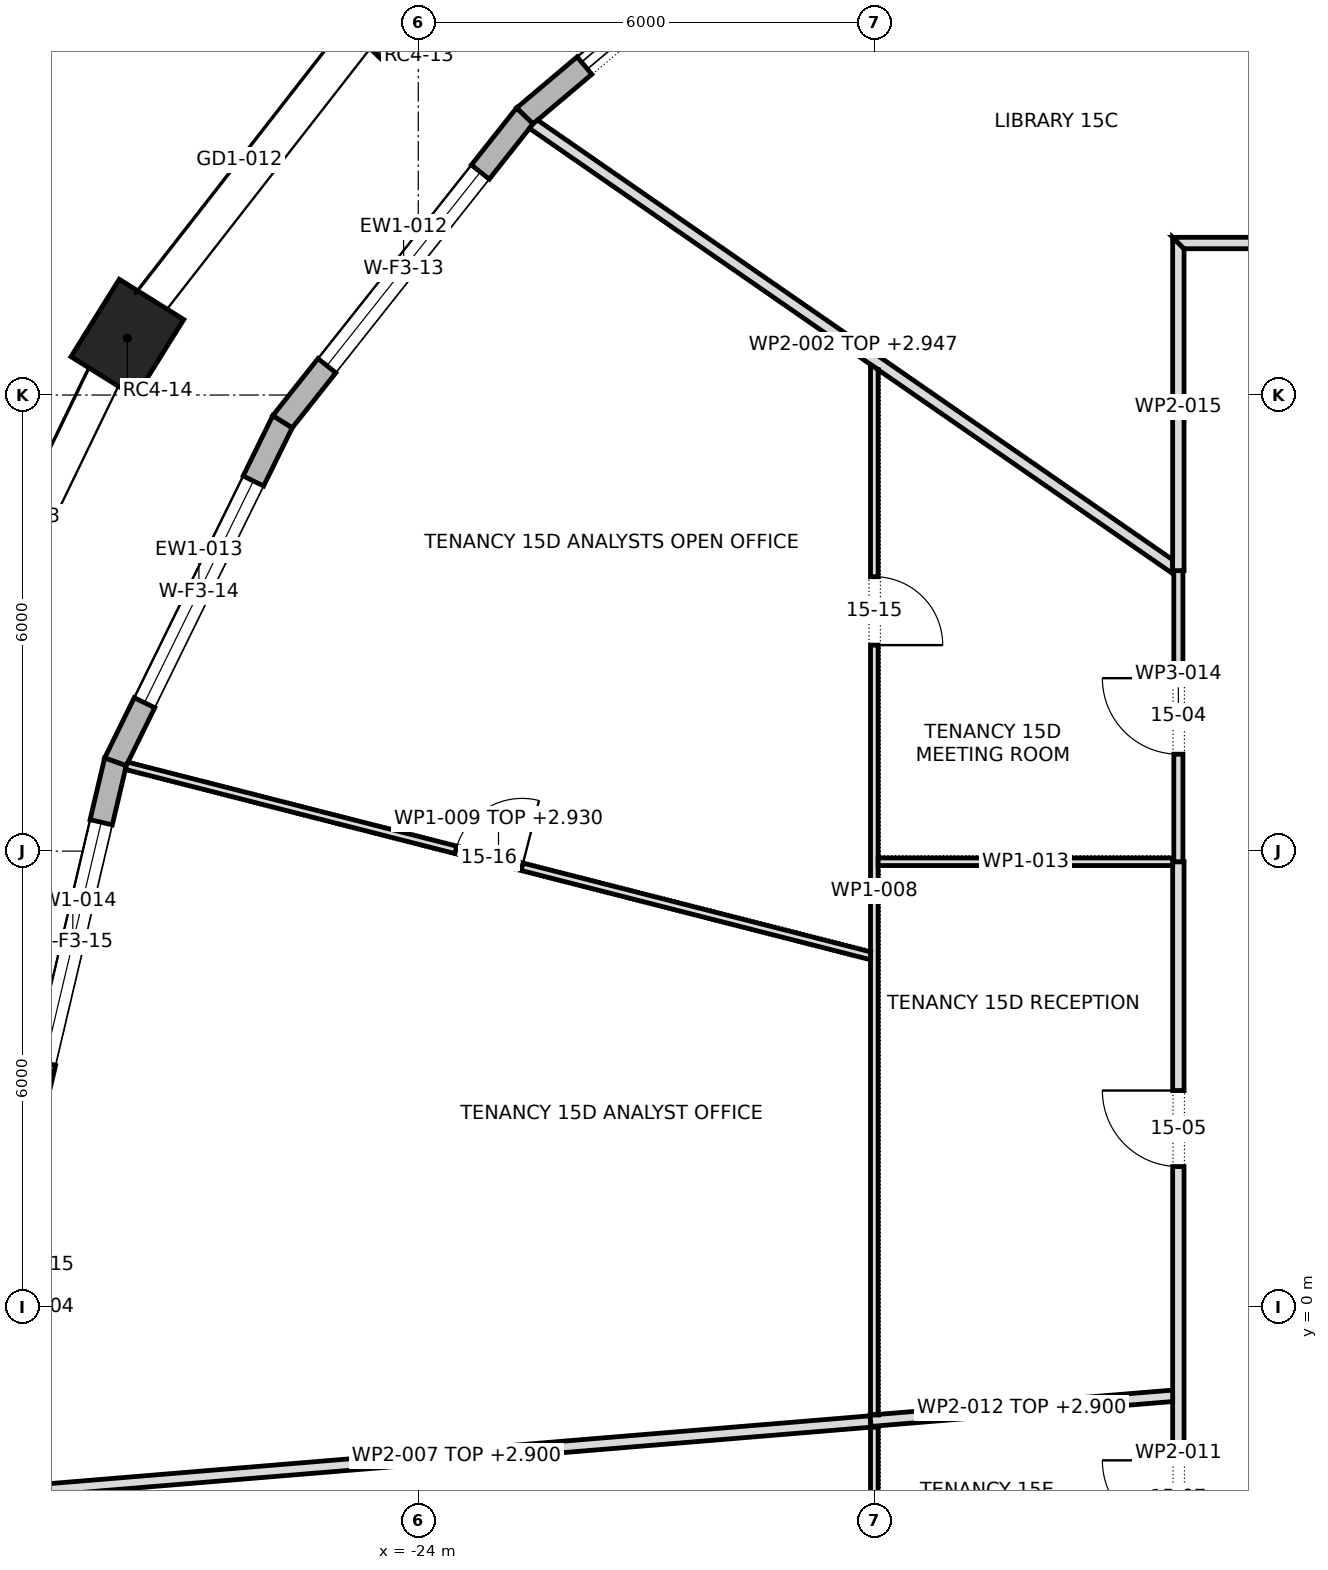
"""IFC4 building model, lengths in metres.
Left out: names, types, materials, properties, quantities, classifications, styles, units other than length and angle.
Written with IfcOpenShell. Run it as: python <this file> out.ifc"""

import sys

from ifc_helpers import new_model, si_unit, direction, frame, frame_2d, origin, origin_2d, place, context, subcontext, project, spatial, polyline, rectangle, outline, extrude, element, fill, save


model = new_model("IFC4")
c1 = context("Model", 3, precision=1e-05, world=origin(), true_north=direction((0.0, 1.0)))
c2 = subcontext(c1, "Body", "Model", "MODEL_VIEW")
j1 = project(units=[si_unit("LENGTHUNIT", "METRE"), si_unit("PLANEANGLEUNIT", "RADIAN")], contexts=[c1])
p1 = place(None, origin())
s1 = spatial("IfcSite", under=j1, at=p1, CompositionType="ELEMENT")
p2 = place(p1, origin())
s2 = spatial("IfcBuilding", under=s1, at=p2, CompositionType="ELEMENT")
p3 = place(p2, frame((0.0, 0.0, 222.9)))
s3 = spatial("IfcBuildingStorey", under=s2, at=p3, CompositionType="ELEMENT", Elevation=222.9)
for number, where, z_axis, x_axis in (
    (1, (-24.39, 17.157, 0.0), (0.0, 0.0, 1.0), (-0.692, -0.722, 0.0)),
    (2, (-27.827, 12.749, 0.0), (0.0, 0.0, 1.0), (-0.529, -0.849, 0.0)),
):
    element("IfcColumn", number, at=place(p3, frame(where, z_axis=z_axis, x_axis=x_axis)), inside=s3, PredefinedType="COLUMN", context=c2, shape_type="SweptSolid", body=[
        extrude(rectangle(XDim=1.2, YDim=1.0, at=origin_2d()), origin(), (0.0, 0.0, 1.0), 4.0),
    ])
p4 = place(p3, frame((-18.543, 19.092, 0.0), z_axis=(0.0, 0.0, 1.0), x_axis=(-0.764397795062, -0.644744919255, 0.0)))
e3 = element("IfcWall", 3, at=p4, inside=s3, PredefinedType="STANDARD", context=c2, shape_type="SweptSolid", body=[
    extrude(outline(polyline([(-0.014, -0.15), (5.32, -0.15), (5.29, 0.15), (0.014, 0.15), (-0.014, -0.15)])), origin(), (0.0, 0.0, 1.0), 3.7),
])
p5 = place(p4, frame((1.028, 0.0, 0.0)))
e4 = element("IfcOpeningElement", 4, at=p5, cuts=e3, PredefinedType="OPENING", context=c2, shape_type="SweptSolid", body=[
    extrude(rectangle(XDim=3.25, YDim=3.25, at=frame_2d((1.625, 1.625))), frame((0.0, 0.162, 0.0), z_axis=(0.0, -1.0, 0.0), x_axis=(1.0, 0.0, 0.0)), (0.0, 0.0, 1.0), 0.324),
])
p6 = place(p3, frame((-22.599, 15.672, 0.0), z_axis=(0.0, 0.0, 1.0), x_axis=(-0.621017151557, -0.783796974651, 0.0)))
e5 = element("IfcWall", 5, at=p6, inside=s3, PredefinedType="STANDARD", context=c2, shape_type="SweptSolid", body=[
    extrude(outline(polyline([(-0.015, -0.15), (5.15, -0.15), (5.118, 0.15), (0.015, 0.15), (-0.015, -0.15)])), origin(), (0.0, 0.0, 1.0), 3.7),
])
p7 = place(p6, frame((0.942, 0.0, 0.6)))
e6 = element("IfcOpeningElement", 6, at=p7, cuts=e5, PredefinedType="OPENING", context=c2, shape_type="SweptSolid", body=[
    extrude(rectangle(XDim=3.25, YDim=2.65, at=frame_2d((1.625, 1.325))), frame((0.0, 0.162, 0.0), z_axis=(0.0, -1.0, 0.0), x_axis=(1.0, 0.0, 0.0)), (0.0, 0.0, 1.0), 0.324),
])
p8 = place(p3, frame((-25.787, 11.648, 0.0), z_axis=(0.0, 0.0, 1.0), x_axis=(-0.440795186599, -0.897607711348, 0.0)))
e7 = element("IfcWall", 7, at=p8, inside=s3, PredefinedType="STANDARD", context=c2, shape_type="SweptSolid", body=[
    extrude(outline(polyline([(-0.016, -0.15), (5.001, -0.15), (4.967, 0.15), (0.016, 0.15), (-0.016, -0.15)])), origin(), (0.0, 0.0, 1.0), 3.7),
])
p9 = place(p8, frame((0.867, 0.0, 0.6)))
e8 = element("IfcOpeningElement", 8, at=p9, cuts=e7, PredefinedType="OPENING", context=c2, shape_type="SweptSolid", body=[
    extrude(rectangle(XDim=3.25, YDim=2.65, at=frame_2d((1.625, 1.325))), frame((0.0, 0.162, 0.0), z_axis=(0.0, -1.0, 0.0), x_axis=(1.0, 0.0, 0.0)), (0.0, 0.0, 1.0), 0.324),
])
p10 = place(p3, frame((-27.984, 7.174, 0.0), z_axis=(0.0, 0.0, 1.0), x_axis=(-0.229546618766, -0.97329766763, 0.0)))
e9 = element("IfcWall", 9, at=p10, inside=s3, PredefinedType="STANDARD", context=c2, shape_type="SweptSolid", body=[
    extrude(outline(polyline([(-0.017, -0.15), (4.899, -0.15), (4.865, 0.15), (0.017, 0.15), (-0.017, -0.15)])), origin(), (0.0, 0.0, 1.0), 3.7),
])
p11 = place(p10, frame((0.816, 0.0, 0.6)))
e10 = element("IfcOpeningElement", 10, at=p11, cuts=e9, PredefinedType="OPENING", context=c2, shape_type="SweptSolid", body=[
    extrude(rectangle(XDim=3.25, YDim=2.65, at=frame_2d((1.625, 1.325))), frame((0.0, 0.162, 0.0), z_axis=(0.0, -1.0, 0.0), x_axis=(1.0, 0.0, 0.0)), (0.0, 0.0, 1.0), 0.324),
])
p12 = place(p3, frame((-29.104, -2.423, 0.0), z_axis=(0.0, 0.0, 1.0), x_axis=(0.229546618766, -0.97329766763, 0.0)))
e11 = element("IfcWall", 11, at=p12, inside=s3, PredefinedType="STANDARD", context=c2, shape_type="SweptSolid", body=[
    extrude(outline(polyline([(-0.017, -0.15), (4.899, -0.15), (4.865, 0.15), (0.017, 0.15), (-0.017, -0.15)])), origin(), (0.0, 0.0, 1.0), 3.7),
])
p13 = place(p12, frame((0.816, 0.0, 0.6)))
e12 = element("IfcOpeningElement", 12, at=p13, cuts=e11, PredefinedType="OPENING", context=c2, shape_type="SweptSolid", body=[
    extrude(rectangle(XDim=3.25, YDim=2.65, at=frame_2d((1.625, 1.325))), frame((0.0, 0.162, 0.0), z_axis=(0.0, -1.0, 0.0), x_axis=(1.0, 0.0, 0.0)), (0.0, 0.0, 1.0), 0.324),
])
p14 = place(p3, frame((-22.494, 15.57, 0.0), z_axis=(0.0, 0.0, 1.0), x_axis=(0.822227997751, -0.569158255421, 0.0)))
e13 = element("IfcWall", 13, at=p14, inside=s3, PredefinedType="PARTITIONING", context=c2, shape_type="SweptSolid", body=[
    extrude(outline(polyline([(0.0, -0.075), (1.858, -0.075), (3.717, -0.075), (5.575, -0.075), (5.577, -0.073), (5.578, -0.075), (7.155, -0.075), (8.732, -0.075), (10.309, -0.075), (10.309, -0.075), (10.281, -0.034), (10.269, -0.043), (10.24, -0.002), (10.24, -0.002), (10.187, 0.075), (8.493, 0.075), (6.8, 0.075), (5.106, 0.075), (3.412, 0.075), (1.719, 0.075), (0.025, 0.075), (0.004, -0.0), (0.0, -0.066), (0.0, -0.075)])), origin(), (0.0, 0.0, 1.0), 2.947),
])
p15 = place(p3, frame((-18.0, -12.421, 0.0), z_axis=(0.0, 0.0, 1.0), x_axis=(0.0, 1.0, 0.0)))
e14 = element("IfcWall", 14, at=p15, inside=s3, PredefinedType="PARTITIONING", context=c2, shape_type="SweptSolid", body=[
    extrude(outline(polyline([(0.087, -0.05), (1.77, -0.05), (3.453, -0.05), (5.136, -0.05), (6.819, -0.05), (8.501, -0.05), (8.501, -0.05), (8.601, -0.05), (8.601, -0.05), (10.842, -0.05), (10.842, 0.046), (10.842, 0.05), (9.191, 0.05), (7.541, 0.05), (5.89, 0.05), (4.24, 0.05), (4.235, 0.048), (4.234, 0.05), (2.823, 0.05), (1.411, 0.05), (0.0, 0.05), (0.0, 0.05), (0.011, 0.034), (0.023, 0.043), (0.087, -0.05)])), origin(), (0.0, 0.0, 1.0), 3.7),
])
p16 = place(p15, frame((5.981, 0.0, 0.0)))
e15 = element("IfcOpeningElement", 15, at=p16, cuts=e14, PredefinedType="OPENING", context=c2, shape_type="SweptSolid", body=[
    extrude(rectangle(XDim=0.9, YDim=2.1, at=frame_2d((0.45, 1.05))), frame((0.0, 0.062, 0.0), z_axis=(0.0, -1.0, 0.0), x_axis=(1.0, 0.0, 0.0)), (0.0, 0.0, 1.0), 0.124),
])
p17 = place(p3, frame((-18.049, -1.504, 0.0), z_axis=(0.0, 0.0, 1.0), x_axis=(-0.996601116086, -0.082378488796, 0.0)))
e16 = element("IfcWall", 16, at=p17, inside=s3, PredefinedType="PARTITIONING", context=c2, shape_type="SweptSolid", body=[
    extrude(outline(polyline([(10.936, -0.075), (10.936, 0.044), (10.931, 0.075), (9.11, 0.075), (7.29, 0.075), (5.469, 0.075), (3.648, 0.075), (1.828, 0.075), (0.007, 0.075), (0.007, 0.074), (0.002, 0.075), (0.0, 0.075), (0.0, -0.075), (1.823, -0.075), (3.645, -0.075), (5.468, -0.075), (7.291, -0.075), (9.113, -0.075), (10.936, -0.075)])), origin(), (0.0, 0.0, 1.0), 2.9),
])
p18 = place(p3, frame((-18.0, -1.418, 0.0), z_axis=(0.0, 0.0, 1.0), x_axis=(0.0, 1.0, 0.0)))
e17 = element("IfcWall", 17, at=p18, inside=s3, PredefinedType="PARTITIONING", context=c2, shape_type="SweptSolid", body=[
    extrude(outline(polyline([(0.008, -0.05), (1.813, -0.05), (3.618, -0.05), (5.423, -0.05), (7.229, -0.05), (7.229, -0.05), (7.328, -0.05), (7.328, -0.05), (8.934, -0.05), (10.54, -0.05), (12.146, -0.05), (13.751, -0.05), (13.821, 0.05), (13.821, 0.05), (11.889, 0.05), (9.957, 0.05), (8.025, 0.05), (6.093, 0.05), (6.092, 0.048), (6.085, 0.05), (4.564, 0.05), (3.042, 0.05), (1.521, 0.05), (0.0, 0.05), (0.0, 0.045), (0.008, -0.05)])), origin(), (0.0, 0.0, 1.0), 3.7),
])
p19 = place(p18, frame((10.128, 0.0, 0.0)))
e18 = element("IfcOpeningElement", 18, at=p19, cuts=e17, PredefinedType="OPENING", context=c2, shape_type="SweptSolid", body=[
    extrude(rectangle(XDim=0.9, YDim=2.1, at=frame_2d((0.45, 1.05))), frame((0.0, 0.062, 0.0), z_axis=(0.0, -1.0, 0.0), x_axis=(1.0, 0.0, 0.0)), (0.0, 0.0, 1.0), 0.124),
])
p20 = place(p3, frame((-18.038, 4.62, 0.0), z_axis=(0.0, 0.0, 1.0), x_axis=(-0.96889210833, 0.247483499279, 0.0)))
e19 = element("IfcWall", 19, at=p20, inside=s3, PredefinedType="PARTITIONING", context=c2, shape_type="SweptSolid", body=[
    extrude(outline(polyline([(0.025, -0.05), (1.706, -0.05), (3.386, -0.05), (5.067, -0.05), (6.747, -0.05), (8.427, -0.05), (10.108, -0.05), (10.117, -0.005), (10.117, 0.05), (8.431, 0.05), (6.745, 0.05), (5.059, 0.05), (3.373, 0.05), (1.686, 0.05), (0.0, 0.05), (0.0, 0.049), (0.025, -0.05)])), origin(), (0.0, 0.0, 1.0), 2.93),
])
p21 = place(p20, frame((4.744, 0.0, 0.0)))
e20 = element("IfcOpeningElement", 20, at=p21, cuts=e19, PredefinedType="OPENING", context=c2, shape_type="SweptSolid", body=[
    extrude(rectangle(XDim=0.9, YDim=2.1, at=frame_2d((0.45, 1.05))), frame((0.0, 0.062, 0.0), z_axis=(0.0, -1.0, 0.0), x_axis=(1.0, 0.0, 0.0)), (0.0, 0.0, 1.0), 0.124),
])
p22 = place(p3, frame((-14.0, -9.729, 0.0), z_axis=(0.0, 0.0, 1.0), x_axis=(0.0, 1.0, 0.0)))
e21 = element("IfcWall", 21, at=p22, inside=s3, PredefinedType="PARTITIONING", context=c2, shape_type="SweptSolid", body=[
    extrude(outline(polyline([(15.589, 0.075), (13.65, 0.075), (11.712, 0.075), (9.773, 0.075), (7.834, 0.075), (5.895, 0.075), (3.956, 0.075), (2.017, 0.075), (0.079, 0.075), (0.0, -0.075), (0.0, -0.075), (1.949, -0.075), (3.897, -0.075), (5.846, -0.075), (7.795, -0.075), (9.743, -0.075), (11.692, -0.075), (13.641, -0.075), (15.589, -0.075), (15.589, 0.075)])), origin(), (0.0, 0.0, 1.0), 3.7),
])
p23 = place(p22, frame((11.579, 0.0, 0.0)))
e22 = element("IfcOpeningElement", 22, at=p23, cuts=e21, PredefinedType="OPENING", context=c2, shape_type="SweptSolid", body=[
    extrude(rectangle(XDim=1.0, YDim=2.1, at=frame_2d((0.5, 1.05))), frame((0.0, 0.087, 0.0), z_axis=(0.0, -1.0, 0.0), x_axis=(1.0, 0.0, 0.0)), (0.0, 0.0, 1.0), 0.174),
])
p24 = place(p22, frame((2.449, 0.0, 0.0)))
e23 = element("IfcOpeningElement", 23, at=p24, cuts=e21, PredefinedType="OPENING", context=c2, shape_type="SweptSolid", body=[
    extrude(rectangle(XDim=1.0, YDim=2.1, at=frame_2d((0.5, 1.05))), frame((0.0, 0.087, 0.0), z_axis=(0.0, -1.0, 0.0), x_axis=(1.0, 0.0, 0.0)), (0.0, 0.0, 1.0), 0.174),
])
p25 = place(p22, frame((6.714, 0.0, 0.0)))
e24 = element("IfcOpeningElement", 24, at=p25, cuts=e21, PredefinedType="OPENING", context=c2, shape_type="SweptSolid", body=[
    extrude(rectangle(XDim=1.0, YDim=2.1, at=frame_2d((0.5, 1.05))), frame((0.0, 0.087, 0.0), z_axis=(0.0, -1.0, 0.0), x_axis=(1.0, 0.0, 0.0)), (0.0, 0.0, 1.0), 0.174),
])
p26 = place(p3, frame((-14.069, -1.166, 0.0), z_axis=(0.0, 0.0, 1.0), x_axis=(-0.996614549641, -0.082215810186, 0.0)))
e25 = element("IfcWall", 25, at=p26, inside=s3, PredefinedType="PARTITIONING", context=c2, shape_type="SweptSolid", body=[
    extrude(outline(polyline([(0.0, -0.075), (1.944, -0.075), (3.888, -0.075), (3.888, -0.067), (3.982, -0.075), (3.994, -0.075), (3.994, 0.075), (2.003, 0.075), (0.012, 0.075), (0.0, -0.069), (0.0, -0.075)])), origin(), (0.0, 0.0, 1.0), 2.9),
])
p27 = place(p3, frame((-14.061, 5.86, 0.0), z_axis=(0.0, 0.0, 1.0), x_axis=(-1.0, 0.0, 0.0)))
e26 = element("IfcWall", 26, at=p27, inside=s3, PredefinedType="PARTITIONING", context=c2, shape_type="SweptSolid", body=[
    extrude(outline(polyline([(3.889, 0.05), (1.952, 0.05), (0.014, 0.05), (0.014, 0.0), (0.0, 0.0), (0.0, -0.05), (1.945, -0.05), (3.889, -0.05), (3.889, 0.05)])), origin(), (0.0, 0.0, 1.0), 3.7),
])
p28 = place(p3, frame((-14.0, 5.86, 0.0), z_axis=(0.0, 0.0, 1.0), x_axis=(0.0, 1.0, 0.0)))
e27 = element("IfcWall", 27, at=p28, inside=s3, PredefinedType="PARTITIONING", context=c2, shape_type="SweptSolid", body=[
    extrude(rectangle(XDim=3.83, YDim=0.12, at=frame_2d((1.915, 0.0))), origin(), (0.0, 0.0, 1.0), 3.7),
])
p29 = place(p28, frame((1.415, 0.0, 0.0)))
e28 = element("IfcOpeningElement", 28, at=p29, cuts=e27, PredefinedType="OPENING", context=c2, shape_type="SweptSolid", body=[
    extrude(rectangle(XDim=1.0, YDim=2.1, at=frame_2d((0.5, 1.05))), frame((0.0, 0.072, 0.0), z_axis=(0.0, -1.0, 0.0), x_axis=(1.0, 0.0, 0.0)), (0.0, 0.0, 1.0), 0.144),
])
p30 = place(p3, frame((-14.0, 9.69, 0.0), z_axis=(0.0, 0.0, 1.0), x_axis=(0.0, 1.0, 0.0)))
e29 = element("IfcWall", 29, at=p30, inside=s3, PredefinedType="PARTITIONING", context=c2, shape_type="SweptSolid", body=[
    extrude(outline(polyline([(0.0, -0.075), (1.412, -0.075), (2.823, -0.075), (4.235, -0.075), (4.385, 0.075), (2.923, 0.075), (1.462, 0.075), (0.0, 0.075), (0.0, -0.075)])), origin(), (0.0, 0.0, 1.0), 3.7),
])
p31 = place(p3, frame((-14.075, 14.0, 0.0), z_axis=(0.0, 0.0, 1.0), x_axis=(1.0, 0.0, 0.0)))
e30 = element("IfcWall", 30, at=p31, inside=s3, PredefinedType="PARTITIONING", context=c2, shape_type="SweptSolid", body=[
    extrude(outline(polyline([(15.705, 0.075), (13.742, 0.075), (11.779, 0.075), (9.815, 0.075), (7.853, 0.075), (5.889, 0.075), (3.926, 0.075), (1.963, 0.075), (0.0, 0.075), (0.15, -0.075), (2.094, -0.075), (4.039, -0.075), (5.983, -0.075), (7.927, -0.075), (9.872, -0.075), (11.816, -0.075), (13.76, -0.075), (15.705, -0.075), (15.705, 0.075)])), origin(), (0.0, 0.0, 1.0), 3.7),
])
p32 = place(p31, frame((9.955, 0.0, 0.0)))
e31 = element("IfcOpeningElement", 31, at=p32, cuts=e30, PredefinedType="OPENING", context=c2, shape_type="SweptSolid", body=[
    extrude(rectangle(XDim=1.0, YDim=2.1, at=frame_2d((0.5, 1.05))), frame((0.0, 0.087, 0.0), z_axis=(0.0, -1.0, 0.0), x_axis=(1.0, 0.0, 0.0)), (0.0, 0.0, 1.0), 0.174),
])
p33 = place(p31, frame((2.14, 0.0, 0.0)))
e32 = element("IfcOpeningElement", 32, at=p33, cuts=e30, PredefinedType="OPENING", context=c2, shape_type="SweptSolid", body=[
    extrude(rectangle(XDim=1.0, YDim=2.1, at=frame_2d((0.5, 1.05))), frame((0.0, 0.087, 0.0), z_axis=(0.0, -1.0, 0.0), x_axis=(1.0, 0.0, 0.0)), (0.0, 0.0, 1.0), 0.174),
])
p34 = place(p3, frame((-8.892, 14.035, 0.0), z_axis=(0.0, 0.0, 1.0), x_axis=(-0.535558051622, 0.84449841524, 0.0)))
e33 = element("IfcWall", 33, at=p34, inside=s3, PredefinedType="PARTITIONING", context=c2, shape_type="SweptSolid", body=[
    extrude(outline(polyline([(0.0, -0.075), (1.798, -0.075), (3.595, -0.075), (5.393, -0.075), (7.191, -0.075), (8.989, -0.075), (9.006, -0.0), (9.01, 0.069), (9.01, 0.075), (7.227, 0.075), (5.444, 0.075), (3.661, 0.075), (1.878, 0.075), (0.095, 0.075), (0.0, -0.075), (0.0, -0.075)])), origin(), (0.0, 0.0, 1.0), 3.1),
])
p35 = place(p5, origin())
e34 = element("IfcDoor", 34, at=p35, inside=s3, OperationType="DOUBLE_DOOR_SLIDING", PredefinedType="DOOR", context=c2, shape_type="SweptSolid", body=[
    extrude(rectangle(XDim=3.25, YDim=3.25, at=frame_2d((1.625, 1.625))), frame((0.0, 0.025, 0.0), z_axis=(0.0, -1.0, 0.0), x_axis=(1.0, 0.0, 0.0)), (0.0, 0.0, 1.0), 0.05),
])
fill(e4, e34)
p36 = place(p7, origin())
e35 = element("IfcWindow", 35, at=p36, inside=s3, PartitioningType="TRIPLE_PANEL_VERTICAL", PredefinedType="WINDOW", context=c2, shape_type="SweptSolid", body=[
    extrude(rectangle(XDim=3.25, YDim=2.65, at=frame_2d((1.625, 1.325))), frame((0.0, 0.03, 0.0), z_axis=(0.0, -1.0, 0.0), x_axis=(1.0, 0.0, 0.0)), (0.0, 0.0, 1.0), 0.06),
])
fill(e6, e35)
p37 = place(p9, origin())
e36 = element("IfcWindow", 36, at=p37, inside=s3, PartitioningType="TRIPLE_PANEL_VERTICAL", PredefinedType="WINDOW", context=c2, shape_type="SweptSolid", body=[
    extrude(rectangle(XDim=3.25, YDim=2.65, at=frame_2d((1.625, 1.325))), frame((0.0, 0.03, 0.0), z_axis=(0.0, -1.0, 0.0), x_axis=(1.0, 0.0, 0.0)), (0.0, 0.0, 1.0), 0.06),
])
fill(e8, e36)
p38 = place(p11, origin())
e37 = element("IfcWindow", 37, at=p38, inside=s3, PartitioningType="TRIPLE_PANEL_VERTICAL", PredefinedType="WINDOW", context=c2, shape_type="SweptSolid", body=[
    extrude(rectangle(XDim=3.25, YDim=2.65, at=frame_2d((1.625, 1.325))), frame((0.0, 0.03, 0.0), z_axis=(0.0, -1.0, 0.0), x_axis=(1.0, 0.0, 0.0)), (0.0, 0.0, 1.0), 0.06),
])
fill(e10, e37)
p39 = place(p29, origin())
e38 = element("IfcDoor", 38, at=p39, inside=s3, OperationType="SINGLE_SWING_LEFT", PredefinedType="DOOR", context=c2, shape_type="SweptSolid", body=[
    extrude(rectangle(XDim=1.0, YDim=2.1, at=frame_2d((0.5, 1.05))), frame((0.0, 0.025, 0.0), z_axis=(0.0, -1.0, 0.0), x_axis=(1.0, 0.0, 0.0)), (0.0, 0.0, 1.0), 0.05),
])
fill(e28, e38)
p40 = place(p23, origin())
e39 = element("IfcDoor", 39, at=p40, inside=s3, OperationType="SINGLE_SWING_LEFT", PredefinedType="DOOR", context=c2, shape_type="SweptSolid", body=[
    extrude(rectangle(XDim=1.0, YDim=2.1, at=frame_2d((0.5, 1.05))), frame((0.0, 0.025, 0.0), z_axis=(0.0, -1.0, 0.0), x_axis=(1.0, 0.0, 0.0)), (0.0, 0.0, 1.0), 0.05),
])
fill(e22, e39)
p41 = place(p25, origin())
e40 = element("IfcDoor", 40, at=p41, inside=s3, OperationType="SINGLE_SWING_LEFT", PredefinedType="DOOR", context=c2, shape_type="SweptSolid", body=[
    extrude(rectangle(XDim=1.0, YDim=2.1, at=frame_2d((0.5, 1.05))), frame((0.0, 0.025, 0.0), z_axis=(0.0, -1.0, 0.0), x_axis=(1.0, 0.0, 0.0)), (0.0, 0.0, 1.0), 0.05),
])
fill(e24, e40)
p42 = place(p19, frame((0.9, 0.0, 0.0), z_axis=(0.0, 0.0, 1.0), x_axis=(-1.0, 0.0, 0.0)))
e41 = element("IfcDoor", 41, at=p42, inside=s3, OperationType="SINGLE_SWING_LEFT", PredefinedType="DOOR", context=c2, shape_type="SweptSolid", body=[
    extrude(rectangle(XDim=0.9, YDim=2.1, at=frame_2d((0.45, 1.05))), frame((0.0, 0.025, 0.0), z_axis=(0.0, -1.0, 0.0), x_axis=(1.0, 0.0, 0.0)), (0.0, 0.0, 1.0), 0.05),
])
fill(e18, e41)
p43 = place(p21, frame((0.9, 0.0, 0.0), z_axis=(0.0, 0.0, 1.0), x_axis=(-1.0, 0.0, 0.0)))
e42 = element("IfcDoor", 42, at=p43, inside=s3, OperationType="SINGLE_SWING_LEFT", PredefinedType="DOOR", context=c2, shape_type="SweptSolid", body=[
    extrude(rectangle(XDim=0.9, YDim=2.1, at=frame_2d((0.45, 1.05))), frame((0.0, 0.025, 0.0), z_axis=(0.0, -1.0, 0.0), x_axis=(1.0, 0.0, 0.0)), (0.0, 0.0, 1.0), 0.05),
])
fill(e20, e42)
save(model, sys.argv[1])
